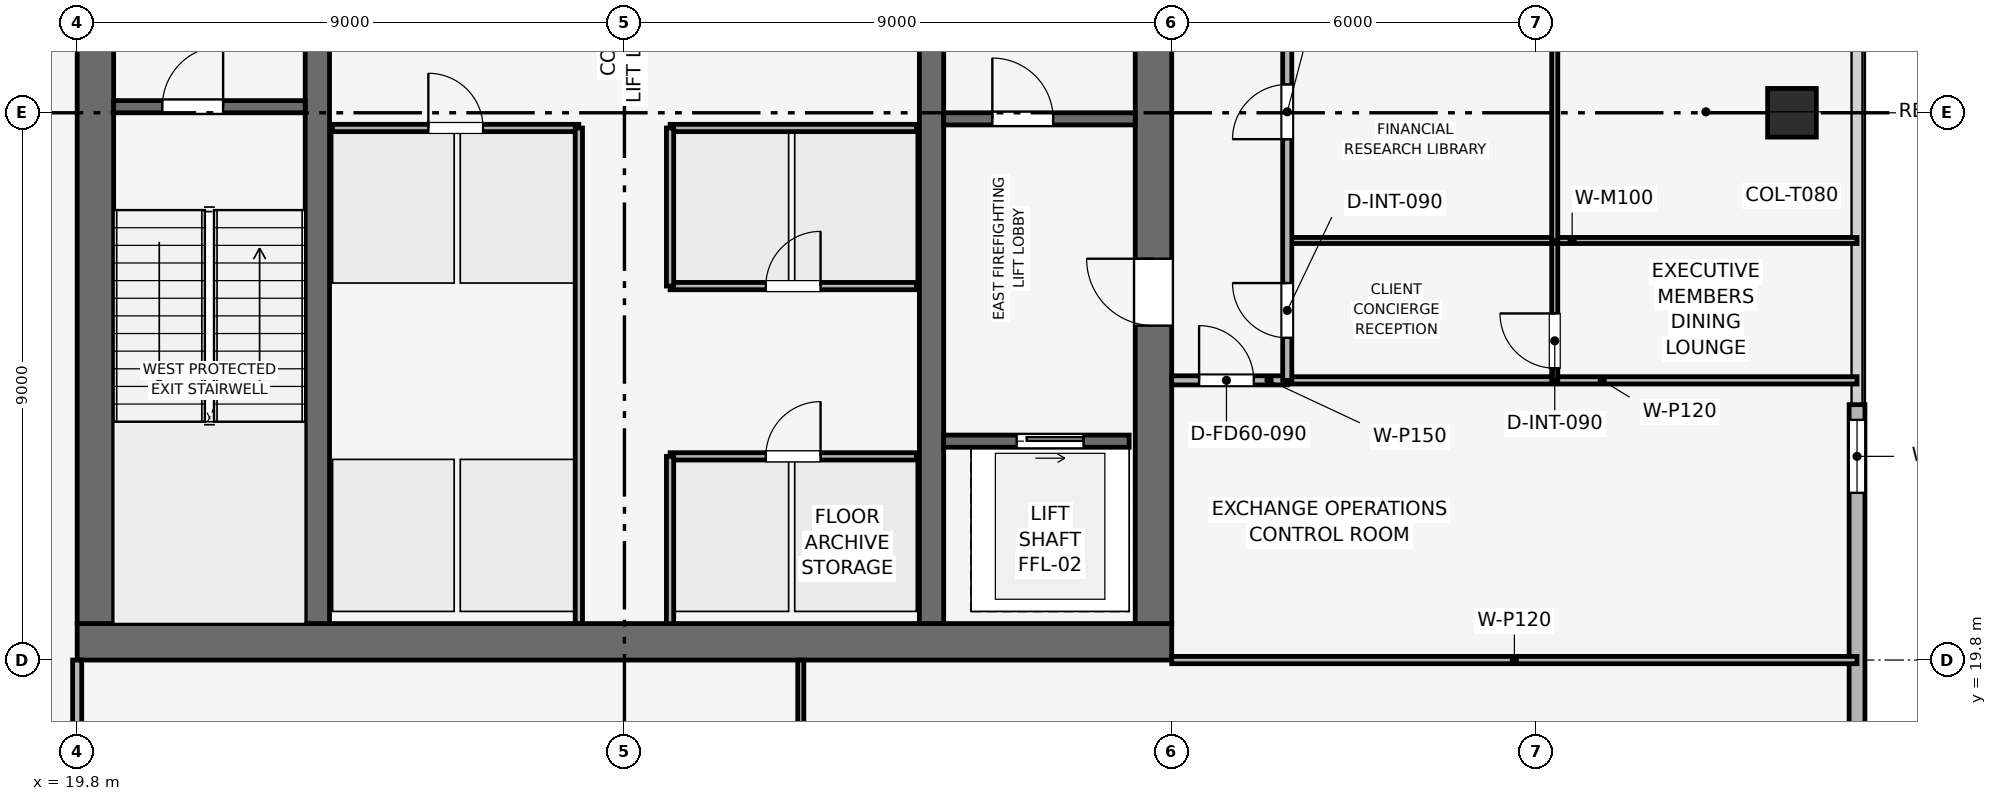
"""IFC4 building model, lengths in metres.
Left out: names, types, materials, properties, quantities, classifications, styles, units other than length and angle.
Written with IfcOpenShell. Run it as: python <this file> out.ifc"""

import sys

from ifc_helpers import new_model, si_unit, direction, frame, frame_2d, origin, origin_2d, place, context, subcontext, project, spatial, rectangle, extrude, element, fill, save


model = new_model("IFC4")
c1 = context("Model", 3, precision=1e-05, world=origin(), true_north=direction((0.0, 1.0)))
c2 = subcontext(c1, "Body", "Model", "MODEL_VIEW")
j1 = project(units=[si_unit("LENGTHUNIT", "METRE"), si_unit("PLANEANGLEUNIT", "RADIAN")], contexts=[c1])
p1 = place(None, origin())
s1 = spatial("IfcSite", under=j1, at=p1, CompositionType="ELEMENT")
p2 = place(p1, origin())
s2 = spatial("IfcBuilding", under=s1, at=p2, CompositionType="ELEMENT")
p3 = place(p2, frame((0.0, 0.0, 360.0)))
s3 = spatial("IfcBuildingStorey", under=s2, at=p3, CompositionType="ELEMENT", Elevation=360.0)
p4 = place(p3, frame((19.8, 20.1, 0.0), z_axis=(0.0, 0.0, 1.0), x_axis=(1.0, 0.0, 0.0)))
e1 = element("IfcWall", 1, at=p4, inside=s3, PredefinedType="SHEAR", context=c2, shape_type="SweptSolid", body=[
    extrude(rectangle(XDim=18.0, YDim=0.6, at=frame_2d((9.0, 0.0))), origin(), (0.0, 0.0, 1.0), 4.5),
])
p5 = place(p3, frame((20.1, 20.4, 0.0), z_axis=(0.0, 0.0, 1.0), x_axis=(0.0, 1.0, 0.0)))
e2 = element("IfcWall", 2, at=p5, inside=s3, PredefinedType="SHEAR", context=c2, shape_type="SweptSolid", body=[
    extrude(rectangle(XDim=16.8, YDim=0.6, at=frame_2d((8.4, 0.0))), origin(), (0.0, 0.0, 1.0), 4.5),
])
p6 = place(p5, frame((10.4, 0.0, 0.0)))
e3 = element("IfcOpeningElement", 3, at=p6, cuts=e2, PredefinedType="OPENING", context=c2, shape_type="SweptSolid", body=[
    extrude(rectangle(XDim=1.1, YDim=2.15, at=frame_2d((0.55, 1.075))), frame((0.0, 0.31, 0.0), z_axis=(0.0, -1.0, 0.0), x_axis=(1.0, 0.0, 0.0)), (0.0, 0.0, 1.0), 0.62),
])
p7 = place(p3, frame((37.5, 20.4, 0.0), z_axis=(0.0, 0.0, 1.0), x_axis=(0.0, 1.0, 0.0)))
e4 = element("IfcWall", 4, at=p7, inside=s3, PredefinedType="SHEAR", context=c2, shape_type="SweptSolid", body=[
    extrude(rectangle(XDim=16.8, YDim=0.6, at=frame_2d((8.4, 0.0))), origin(), (0.0, 0.0, 1.0), 4.5),
])
p8 = place(p7, frame((4.9, 0.0, 0.0)))
e5 = element("IfcOpeningElement", 5, at=p8, cuts=e4, PredefinedType="OPENING", context=c2, shape_type="SweptSolid", body=[
    extrude(rectangle(XDim=1.1, YDim=2.15, at=frame_2d((0.55, 1.075))), frame((0.0, 0.31, 0.0), z_axis=(0.0, -1.0, 0.0), x_axis=(1.0, 0.0, 0.0)), (0.0, 0.0, 1.0), 0.62),
])
for number, where, z_axis, x_axis in (
    (6, (23.75, 20.4, 0.0), (0.0, 0.0, 1.0), (0.0, 1.0, 0.0)),
    (7, (33.85, 20.4, 0.0), (0.0, 0.0, 1.0), (0.0, 1.0, 0.0)),
):
    element("IfcWall", number, at=place(p3, frame(where, z_axis=z_axis, x_axis=x_axis)), inside=s3, PredefinedType="SHEAR", context=c2, shape_type="SweptSolid", body=[
        extrude(rectangle(XDim=16.8, YDim=0.4, at=frame_2d((8.4, 0.0))), origin(), (0.0, 0.0, 1.0), 4.5),
    ])
p9 = place(p3, frame((48.0, 28.8, 0.003), z_axis=(0.0, 0.0, 1.0), x_axis=(1.0, 0.0, 0.0)))
e8 = element("IfcColumn", 8, at=p9, inside=s3, PredefinedType="COLUMN", context=c2, shape_type="SweptSolid", body=[
    extrude(rectangle(XDim=0.8, YDim=0.8, at=origin_2d()), origin(), (0.0, 0.0, 1.0), 4.234),
])
p10 = place(p3, frame((49.07, 24.0, 0.0), z_axis=(0.0, 0.0, 1.0), x_axis=(0.0, -1.0, 0.0)))
e9 = element("IfcWall", 9, at=p10, inside=s3, PredefinedType="SOLIDWALL", context=c2, shape_type="SweptSolid", body=[
    extrude(rectangle(XDim=10.0, YDim=0.26, at=frame_2d((5.0, 0.0))), origin(), (0.0, 0.0, 1.0), 4.24),
])
p11 = place(p10, frame((0.25, 0.0, 0.9)))
e10 = element("IfcOpeningElement", 10, at=p11, cuts=e9, PredefinedType="OPENING", context=c2, shape_type="SweptSolid", body=[
    extrude(rectangle(XDim=1.2, YDim=2.1, at=frame_2d((0.6, 1.05))), frame((0.0, 0.14, 0.0), z_axis=(0.0, -1.0, 0.0), x_axis=(1.0, 0.0, 0.0)), (0.0, 0.0, 1.0), 0.28),
])
p12 = place(p3, frame((20.4, 28.9, 0.0), z_axis=(0.0, 0.0, 1.0), x_axis=(1.0, 0.0, 0.0)))
e11 = element("IfcWall", 11, at=p12, inside=s3, PredefinedType="SHEAR", context=c2, shape_type="SweptSolid", body=[
    extrude(rectangle(XDim=3.15, YDim=0.2, at=frame_2d((1.575, 0.0))), origin(), (0.0, 0.0, 1.0), 4.24),
])
p13 = place(p12, frame((0.8, 0.0, 0.0)))
e12 = element("IfcOpeningElement", 12, at=p13, cuts=e11, PredefinedType="OPENING", context=c2, shape_type="SweptSolid", body=[
    extrude(rectangle(XDim=1.0, YDim=2.1, at=frame_2d((0.5, 1.05))), frame((0.0, 0.11, 0.0), z_axis=(0.0, -1.0, 0.0), x_axis=(1.0, 0.0, 0.0)), (0.0, 0.0, 1.0), 0.22),
])
p14 = place(p3, frame((34.05, 28.7, 0.0), z_axis=(0.0, 0.0, 1.0), x_axis=(1.0, 0.0, 0.0)))
e13 = element("IfcWall", 13, at=p14, inside=s3, PredefinedType="SHEAR", context=c2, shape_type="SweptSolid", body=[
    extrude(rectangle(XDim=3.15, YDim=0.2, at=frame_2d((1.575, 0.0))), origin(), (0.0, 0.0, 1.0), 4.24),
])
p15 = place(p14, frame((0.8, 0.0, 0.0)))
e14 = element("IfcOpeningElement", 14, at=p15, cuts=e13, PredefinedType="OPENING", context=c2, shape_type="SweptSolid", body=[
    extrude(rectangle(XDim=1.0, YDim=2.1, at=frame_2d((0.5, 1.05))), frame((0.0, 0.11, 0.0), z_axis=(0.0, -1.0, 0.0), x_axis=(1.0, 0.0, 0.0)), (0.0, 0.0, 1.0), 0.22),
])
p16 = place(p3, frame((34.05, 23.4, 0.0), z_axis=(0.0, 0.0, 1.0), x_axis=(1.0, 0.0, 0.0)))
e15 = element("IfcWall", 15, at=p16, inside=s3, PredefinedType="SHEAR", context=c2, shape_type="SweptSolid", body=[
    extrude(rectangle(XDim=3.05, YDim=0.2, at=frame_2d((1.525, 0.0))), origin(), (0.0, 0.0, 1.0), 4.24),
])
p17 = place(p16, frame((1.2, 0.0, 0.0)))
e16 = element("IfcOpeningElement", 16, at=p17, cuts=e15, PredefinedType="OPENING", context=c2, shape_type="SweptSolid", body=[
    extrude(rectangle(XDim=1.1, YDim=2.15, at=frame_2d((0.55, 1.075))), frame((0.0, 0.11, 0.0), z_axis=(0.0, -1.0, 0.0), x_axis=(1.0, 0.0, 0.0)), (0.0, 0.0, 1.0), 0.22),
])
p18 = place(p3, frame((24.0, 28.55, 0.0), z_axis=(0.0, 0.0, 1.0), x_axis=(1.0, 0.0, 0.0)))
e17 = element("IfcWall", 17, at=p18, inside=s3, PredefinedType="PARTITIONING", context=c2, shape_type="SweptSolid", body=[
    extrude(rectangle(XDim=4.05, YDim=0.12, at=frame_2d((2.025, 0.0))), origin(), (0.0, 0.0, 1.0), 4.24),
])
p19 = place(p18, frame((1.575, 0.0, 0.0)))
e18 = element("IfcOpeningElement", 18, at=p19, cuts=e17, PredefinedType="OPENING", context=c2, shape_type="SweptSolid", body=[
    extrude(rectangle(XDim=0.9, YDim=2.1, at=frame_2d((0.45, 1.05))), frame((0.0, 0.07, 0.0), z_axis=(0.0, -1.0, 0.0), x_axis=(1.0, 0.0, 0.0)), (0.0, 0.0, 1.0), 0.14),
])
p20 = place(p3, frame((28.05, 20.4, 0.0), z_axis=(0.0, 0.0, 1.0), x_axis=(0.0, 1.0, 0.0)))
e19 = element("IfcWall", 19, at=p20, inside=s3, PredefinedType="PARTITIONING", context=c2, shape_type="SweptSolid", body=[
    extrude(rectangle(XDim=8.15, YDim=0.12, at=frame_2d((4.075, 0.0))), origin(), (0.0, 0.0, 1.0), 4.24),
])
p21 = place(p3, frame((29.55, 23.15, 0.0), z_axis=(0.0, 0.0, 1.0), x_axis=(1.0, 0.0, 0.0)))
e20 = element("IfcWall", 20, at=p21, inside=s3, PredefinedType="PARTITIONING", context=c2, shape_type="SweptSolid", body=[
    extrude(rectangle(XDim=4.05, YDim=0.12, at=frame_2d((2.025, 0.0))), origin(), (0.0, 0.0, 1.0), 4.24),
])
p22 = place(p21, frame((1.575, 0.0, 0.0)))
e21 = element("IfcOpeningElement", 21, at=p22, cuts=e20, PredefinedType="OPENING", context=c2, shape_type="SweptSolid", body=[
    extrude(rectangle(XDim=0.9, YDim=2.1, at=frame_2d((0.45, 1.05))), frame((0.0, 0.07, 0.0), z_axis=(0.0, -1.0, 0.0), x_axis=(1.0, 0.0, 0.0)), (0.0, 0.0, 1.0), 0.14),
])
p23 = place(p3, frame((29.55, 20.4, 0.0), z_axis=(0.0, 0.0, 1.0), x_axis=(0.0, 1.0, 0.0)))
e22 = element("IfcWall", 22, at=p23, inside=s3, PredefinedType="PARTITIONING", context=c2, shape_type="SweptSolid", body=[
    extrude(rectangle(XDim=2.75, YDim=0.12, at=frame_2d((1.375, 0.0))), origin(), (0.0, 0.0, 1.0), 4.24),
])
p24 = place(p3, frame((29.55, 25.95, 0.0), z_axis=(0.0, 0.0, 1.0), x_axis=(1.0, 0.0, 0.0)))
e23 = element("IfcWall", 23, at=p24, inside=s3, PredefinedType="PARTITIONING", context=c2, shape_type="SweptSolid", body=[
    extrude(rectangle(XDim=4.05, YDim=0.12, at=frame_2d((2.025, 0.0))), origin(), (0.0, 0.0, 1.0), 4.24),
])
p25 = place(p24, frame((1.575, 0.0, 0.0)))
e24 = element("IfcOpeningElement", 24, at=p25, cuts=e23, PredefinedType="OPENING", context=c2, shape_type="SweptSolid", body=[
    extrude(rectangle(XDim=0.9, YDim=2.1, at=frame_2d((0.45, 1.05))), frame((0.0, 0.07, 0.0), z_axis=(0.0, -1.0, 0.0), x_axis=(1.0, 0.0, 0.0)), (0.0, 0.0, 1.0), 0.14),
])
p26 = place(p3, frame((29.55, 28.55, 0.0), z_axis=(0.0, 0.0, 1.0), x_axis=(1.0, 0.0, 0.0)))
e25 = element("IfcWall", 25, at=p26, inside=s3, PredefinedType="PARTITIONING", context=c2, shape_type="SweptSolid", body=[
    extrude(rectangle(XDim=4.05, YDim=0.12, at=frame_2d((2.025, 0.0))), origin(), (0.0, 0.0, 1.0), 4.24),
])
p27 = place(p3, frame((29.55, 25.95, 0.0), z_axis=(0.0, 0.0, 1.0), x_axis=(0.0, 1.0, 0.0)))
e26 = element("IfcWall", 26, at=p27, inside=s3, PredefinedType="PARTITIONING", context=c2, shape_type="SweptSolid", body=[
    extrude(rectangle(XDim=2.6, YDim=0.12, at=frame_2d((1.3, 0.0))), origin(), (0.0, 0.0, 1.0), 4.24),
])
p28 = place(p3, frame((19.8, 8.53, 0.0), z_axis=(0.0, 0.0, 1.0), x_axis=(0.0, 1.0, 0.0)))
e27 = element("IfcWall", 27, at=p28, inside=s3, PredefinedType="PARTITIONING", context=c2, shape_type="SweptSolid", body=[
    extrude(rectangle(XDim=11.27, YDim=0.15, at=frame_2d((5.635, 0.0))), origin(), (0.0, 0.0, 1.0), 3.825),
])
p29 = place(p28, frame((7.92, 0.0, 0.0)))
e28 = element("IfcOpeningElement", 28, at=p29, cuts=e27, PredefinedType="OPENING", context=c2, shape_type="SweptSolid", body=[
    extrude(rectangle(XDim=0.9, YDim=2.1, at=frame_2d((0.45, 1.05))), frame((0.0, 0.085, 0.0), z_axis=(0.0, -1.0, 0.0), x_axis=(1.0, 0.0, 0.0)), (0.0, 0.0, 1.0), 0.17),
])
p30 = place(p3, frame((31.7, 8.53, 0.0), z_axis=(0.0, 0.0, 1.0), x_axis=(0.0, 1.0, 0.0)))
e29 = element("IfcWall", 29, at=p30, inside=s3, PredefinedType="MOVABLE", context=c2, shape_type="SweptSolid", body=[
    extrude(rectangle(XDim=11.27, YDim=0.1, at=frame_2d((5.635, 0.0))), origin(), (0.0, 0.0, 1.0), 3.865),
])
p31 = place(p30, frame((8.87, 0.0, 0.0)))
e30 = element("IfcOpeningElement", 30, at=p31, cuts=e29, PredefinedType="OPENING", context=c2, shape_type="SweptSolid", body=[
    extrude(rectangle(XDim=0.9, YDim=2.1, at=frame_2d((0.45, 1.05))), frame((0.0, 0.06, 0.0), z_axis=(0.0, -1.0, 0.0), x_axis=(1.0, 0.0, 0.0)), (0.0, 0.0, 1.0), 0.12),
])
p32 = place(p3, frame((37.8, 19.8, 0.0), z_axis=(0.0, 0.0, 1.0), x_axis=(1.0, 0.0, 0.0)))
e31 = element("IfcWall", 31, at=p32, inside=s3, PredefinedType="PARTITIONING", context=c2, shape_type="SweptSolid", body=[
    extrude(rectangle(XDim=11.27, YDim=0.12, at=frame_2d((5.635, 0.0))), origin(), (0.0, 0.0, 1.0), 3.825),
])
p33 = place(p3, frame((37.8, 24.4, 0.0), z_axis=(0.0, 0.0, 1.0), x_axis=(1.0, 0.0, 0.0)))
e32 = element("IfcWall", 32, at=p33, inside=s3, PredefinedType="PARTITIONING", context=c2, shape_type="SweptSolid", body=[
    extrude(rectangle(XDim=1.9, YDim=0.15, at=frame_2d((0.95, 0.0))), origin(), (0.0, 0.0, 1.0), 4.24),
])
p34 = place(p33, frame((0.45, 0.0, 0.0)))
e33 = element("IfcOpeningElement", 33, at=p34, cuts=e32, PredefinedType="OPENING", context=c2, shape_type="SweptSolid", body=[
    extrude(rectangle(XDim=0.9, YDim=2.1, at=frame_2d((0.45, 1.05))), frame((0.0, 0.085, 0.0), z_axis=(0.0, -1.0, 0.0), x_axis=(1.0, 0.0, 0.0)), (0.0, 0.0, 1.0), 0.17),
])
p35 = place(p3, frame((39.7, 24.4, 0.0), z_axis=(0.0, 0.0, 1.0), x_axis=(1.0, 0.0, 0.0)))
e34 = element("IfcWall", 34, at=p35, inside=s3, PredefinedType="PARTITIONING", context=c2, shape_type="SweptSolid", body=[
    extrude(rectangle(XDim=9.37, YDim=0.12, at=frame_2d((4.685, 0.0))), origin(), (0.0, 0.0, 1.0), 3.865),
])
p36 = place(p3, frame((44.099, 24.4, 0.0), z_axis=(0.0, 0.0, 1.0), x_axis=(0.0, 1.0, 0.0)))
e35 = element("IfcWall", 35, at=p36, inside=s3, PredefinedType="MOVABLE", context=c2, shape_type="SweptSolid", body=[
    extrude(rectangle(XDim=2.3, YDim=0.1, at=frame_2d((1.15, 0.0))), origin(), (0.0, 0.0, 1.0), 4.24),
])
p37 = place(p36, frame((0.2, 0.0, 0.0)))
e36 = element("IfcOpeningElement", 36, at=p37, cuts=e35, PredefinedType="OPENING", context=c2, shape_type="SweptSolid", body=[
    extrude(rectangle(XDim=0.9, YDim=2.1, at=frame_2d((0.45, 1.05))), frame((0.0, 0.06, 0.0), z_axis=(0.0, -1.0, 0.0), x_axis=(1.0, 0.0, 0.0)), (0.0, 0.0, 1.0), 0.12),
])
p38 = place(p3, frame((39.7, 26.7, 0.0), z_axis=(0.0, 0.0, 1.0), x_axis=(1.0, 0.0, 0.0)))
e37 = element("IfcWall", 37, at=p38, inside=s3, PredefinedType="MOVABLE", context=c2, shape_type="SweptSolid", body=[
    extrude(rectangle(XDim=9.37, YDim=0.1, at=frame_2d((4.685, 0.0))), origin(), (0.0, 0.0, 1.0), 3.865),
])
p39 = place(p3, frame((44.099, 26.7, 0.0), z_axis=(0.0, 0.0, 1.0), x_axis=(0.0, 1.0, 0.0)))
e38 = element("IfcWall", 38, at=p39, inside=s3, PredefinedType="MOVABLE", context=c2, shape_type="SweptSolid", body=[
    extrude(rectangle(XDim=4.231, YDim=0.1, at=frame_2d((2.115, 0.0))), origin(), (0.0, 0.0, 1.0), 3.825),
])
p40 = place(p39, frame((3.131, 0.0, 0.0)))
e39 = element("IfcOpeningElement", 39, at=p40, cuts=e38, PredefinedType="OPENING", context=c2, shape_type="SweptSolid", body=[
    extrude(rectangle(XDim=0.9, YDim=2.1, at=frame_2d((0.45, 1.05))), frame((0.0, 0.06, 0.0), z_axis=(0.0, -1.0, 0.0), x_axis=(1.0, 0.0, 0.0)), (0.0, 0.0, 1.0), 0.12),
])
p41 = place(p3, frame((39.7, 24.4, 0.0), z_axis=(0.0, 0.0, 1.0), x_axis=(0.0, 1.0, 0.0)))
e40 = element("IfcWall", 40, at=p41, inside=s3, PredefinedType="PARTITIONING", context=c2, shape_type="SweptSolid", body=[
    extrude(rectangle(XDim=15.3, YDim=0.15, at=frame_2d((7.65, 0.0))), origin(), (0.0, 0.0, 1.0), 3.825),
])
p42 = place(p41, frame((0.7, 0.0, 0.0)))
e41 = element("IfcOpeningElement", 41, at=p42, cuts=e40, PredefinedType="OPENING", context=c2, shape_type="SweptSolid", body=[
    extrude(rectangle(XDim=0.9, YDim=2.1, at=frame_2d((0.45, 1.05))), frame((0.0, 0.085, 0.0), z_axis=(0.0, -1.0, 0.0), x_axis=(1.0, 0.0, 0.0)), (0.0, 0.0, 1.0), 0.17),
])
p43 = place(p41, frame((3.966, 0.0, 0.0)))
e42 = element("IfcOpeningElement", 42, at=p43, cuts=e40, PredefinedType="OPENING", context=c2, shape_type="SweptSolid", body=[
    extrude(rectangle(XDim=0.9, YDim=2.1, at=frame_2d((0.45, 1.05))), frame((0.0, 0.085, 0.0), z_axis=(0.0, -1.0, 0.0), x_axis=(1.0, 0.0, 0.0)), (0.0, 0.0, 1.0), 0.17),
])
p44 = place(p41, frame((10.465, 0.0, 0.0)))
e43 = element("IfcOpeningElement", 43, at=p44, cuts=e40, PredefinedType="OPENING", context=c2, shape_type="SweptSolid", body=[
    extrude(rectangle(XDim=0.9, YDim=2.1, at=frame_2d((0.45, 1.05))), frame((0.0, 0.085, 0.0), z_axis=(0.0, -1.0, 0.0), x_axis=(1.0, 0.0, 0.0)), (0.0, 0.0, 1.0), 0.17),
])
p45 = place(p11, origin())
e44 = element("IfcWindow", 44, at=p45, inside=s3, PartitioningType="SINGLE_PANEL", PredefinedType="WINDOW", context=c2, shape_type="SweptSolid", body=[
    extrude(rectangle(XDim=1.2, YDim=2.1, at=frame_2d((0.6, 1.05))), frame((0.0, 0.03, 0.0), z_axis=(0.0, -1.0, 0.0), x_axis=(1.0, 0.0, 0.0)), (0.0, 0.0, 1.0), 0.06),
])
fill(e10, e44)
p46 = place(p13, origin())
e45 = element("IfcDoor", 45, at=p46, inside=s3, OperationType="SINGLE_SWING_RIGHT", PredefinedType="DOOR", context=c2, shape_type="SweptSolid", body=[
    extrude(rectangle(XDim=1.0, YDim=2.1, at=frame_2d((0.5, 1.05))), frame((0.0, 0.025, 0.0), z_axis=(0.0, -1.0, 0.0), x_axis=(1.0, 0.0, 0.0)), (0.0, 0.0, 1.0), 0.05),
])
fill(e12, e45)
p47 = place(p15, origin())
e46 = element("IfcDoor", 46, at=p47, inside=s3, OperationType="SINGLE_SWING_LEFT", PredefinedType="DOOR", context=c2, shape_type="SweptSolid", body=[
    extrude(rectangle(XDim=1.0, YDim=2.1, at=frame_2d((0.5, 1.05))), frame((0.0, 0.025, 0.0), z_axis=(0.0, -1.0, 0.0), x_axis=(1.0, 0.0, 0.0)), (0.0, 0.0, 1.0), 0.05),
])
fill(e14, e46)
p48 = place(p17, origin())
e47 = element("IfcDoor", 47, at=p48, inside=s3, OperationType="SLIDING_TO_RIGHT", PredefinedType="DOOR", context=c2, shape_type="SweptSolid", body=[
    extrude(rectangle(XDim=1.1, YDim=2.15, at=frame_2d((0.55, 1.075))), frame((0.0, 0.025, 0.0), z_axis=(0.0, -1.0, 0.0), x_axis=(1.0, 0.0, 0.0)), (0.0, 0.0, 1.0), 0.05),
])
fill(e16, e47)
p49 = place(p19, origin())
e48 = element("IfcDoor", 48, at=p49, inside=s3, OperationType="SINGLE_SWING_LEFT", PredefinedType="DOOR", context=c2, shape_type="SweptSolid", body=[
    extrude(rectangle(XDim=0.9, YDim=2.1, at=frame_2d((0.45, 1.05))), frame((0.0, 0.025, 0.0), z_axis=(0.0, -1.0, 0.0), x_axis=(1.0, 0.0, 0.0)), (0.0, 0.0, 1.0), 0.05),
])
fill(e18, e48)
p50 = place(p22, origin())
e49 = element("IfcDoor", 49, at=p50, inside=s3, OperationType="SINGLE_SWING_RIGHT", PredefinedType="DOOR", context=c2, shape_type="SweptSolid", body=[
    extrude(rectangle(XDim=0.9, YDim=2.1, at=frame_2d((0.45, 1.05))), frame((0.0, 0.025, 0.0), z_axis=(0.0, -1.0, 0.0), x_axis=(1.0, 0.0, 0.0)), (0.0, 0.0, 1.0), 0.05),
])
fill(e21, e49)
p51 = place(p25, origin())
e50 = element("IfcDoor", 50, at=p51, inside=s3, OperationType="SINGLE_SWING_RIGHT", PredefinedType="DOOR", context=c2, shape_type="SweptSolid", body=[
    extrude(rectangle(XDim=0.9, YDim=2.1, at=frame_2d((0.45, 1.05))), frame((0.0, 0.025, 0.0), z_axis=(0.0, -1.0, 0.0), x_axis=(1.0, 0.0, 0.0)), (0.0, 0.0, 1.0), 0.05),
])
fill(e24, e50)
p52 = place(p34, origin())
e51 = element("IfcDoor", 51, at=p52, inside=s3, OperationType="SINGLE_SWING_LEFT", PredefinedType="DOOR", context=c2, shape_type="SweptSolid", body=[
    extrude(rectangle(XDim=0.9, YDim=2.1, at=frame_2d((0.45, 1.05))), frame((0.0, 0.025, 0.0), z_axis=(0.0, -1.0, 0.0), x_axis=(1.0, 0.0, 0.0)), (0.0, 0.0, 1.0), 0.05),
])
fill(e33, e51)
p53 = place(p37, origin())
e52 = element("IfcDoor", 52, at=p53, inside=s3, OperationType="SINGLE_SWING_RIGHT", PredefinedType="DOOR", context=c2, shape_type="SweptSolid", body=[
    extrude(rectangle(XDim=0.9, YDim=2.1, at=frame_2d((0.45, 1.05))), frame((0.0, 0.025, 0.0), z_axis=(0.0, -1.0, 0.0), x_axis=(1.0, 0.0, 0.0)), (0.0, 0.0, 1.0), 0.05),
])
fill(e36, e52)
p54 = place(p42, origin())
e53 = element("IfcDoor", 53, at=p54, inside=s3, OperationType="SINGLE_SWING_RIGHT", PredefinedType="DOOR", context=c2, shape_type="SweptSolid", body=[
    extrude(rectangle(XDim=0.9, YDim=2.1, at=frame_2d((0.45, 1.05))), frame((0.0, 0.025, 0.0), z_axis=(0.0, -1.0, 0.0), x_axis=(1.0, 0.0, 0.0)), (0.0, 0.0, 1.0), 0.05),
])
fill(e41, e53)
p55 = place(p43, origin())
e54 = element("IfcDoor", 54, at=p55, inside=s3, OperationType="SINGLE_SWING_LEFT", PredefinedType="DOOR", context=c2, shape_type="SweptSolid", body=[
    extrude(rectangle(XDim=0.9, YDim=2.1, at=frame_2d((0.45, 1.05))), frame((0.0, 0.025, 0.0), z_axis=(0.0, -1.0, 0.0), x_axis=(1.0, 0.0, 0.0)), (0.0, 0.0, 1.0), 0.05),
])
fill(e42, e54)
p56 = place(p8, origin())
e55 = element("IfcDoor", 55, at=p56, inside=s3, OperationType="SINGLE_SWING_RIGHT", PredefinedType="DOOR", context=c2, shape_type="SweptSolid", body=[
    extrude(rectangle(XDim=1.1, YDim=2.15, at=frame_2d((0.55, 1.075))), frame((0.0, 0.025, 0.0), z_axis=(0.0, -1.0, 0.0), x_axis=(1.0, 0.0, 0.0)), (0.0, 0.0, 1.0), 0.05),
])
fill(e5, e55)
save(model, sys.argv[1])
